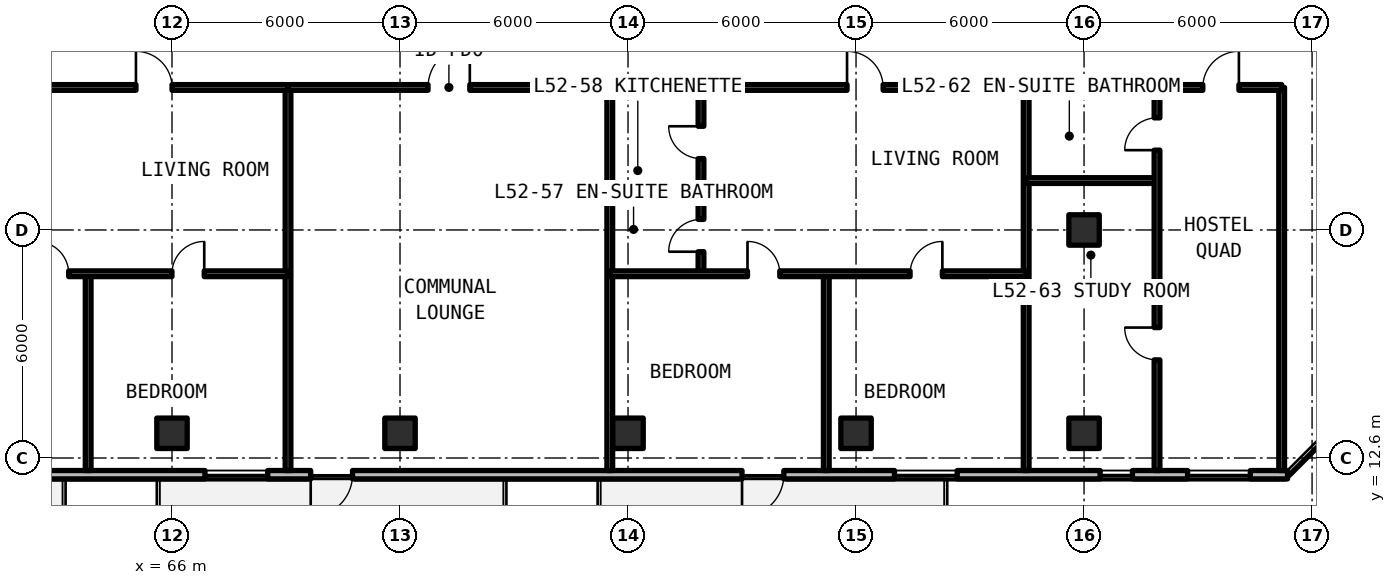
"""IFC4 building model, lengths in metres.
Left out: names, types, materials, properties, quantities, classifications, styles, units other than length and angle.
Written with IfcOpenShell. Run it as: python <this file> out.ifc"""

import sys

from ifc_helpers import new_model, si_unit, direction, frame, frame_2d, origin, origin_2d, place, context, subcontext, project, spatial, rectangle, extrude, element, fill, save


model = new_model("IFC4")
c1 = context("Model", 3, precision=1e-05, world=origin(), true_north=direction((0.0, 1.0)))
c2 = subcontext(c1, "Body", "Model", "MODEL_VIEW")
j1 = project(units=[si_unit("LENGTHUNIT", "METRE"), si_unit("PLANEANGLEUNIT", "RADIAN")], contexts=[c1])
p1 = place(None, origin())
s1 = spatial("IfcSite", under=j1, at=p1, CompositionType="ELEMENT")
p2 = place(p1, origin())
s2 = spatial("IfcBuilding", under=s1, at=p2, CompositionType="ELEMENT")
p3 = place(p2, frame((0.0, 0.0, 188.43)))
s3 = spatial("IfcBuildingStorey", under=s2, at=p3, CompositionType="ELEMENT", Elevation=188.43)
for number, where, z_axis, x_axis in (
    (1, (90.0, 18.6, 0.0), (0.0, 0.0, 1.0), (1.0, 0.0, 0.0)),
    (2, (66.0, 13.25, 0.0), (0.0, 0.0, 1.0), (1.0, 0.0, 0.0)),
    (3, (72.0, 13.25, 0.0), (0.0, 0.0, 1.0), (1.0, 0.0, 0.0)),
    (4, (78.0, 13.25, 0.0), (0.0, 0.0, 1.0), (1.0, 0.0, 0.0)),
    (5, (84.0, 13.25, 0.0), (0.0, 0.0, 1.0), (1.0, 0.0, 0.0)),
    (6, (90.0, 13.25, 0.0), (0.0, 0.0, 1.0), (1.0, 0.0, 0.0)),
):
    element("IfcColumn", number, at=place(p3, frame(where, z_axis=z_axis, x_axis=x_axis)), inside=s3, PredefinedType="COLUMN", context=c2, shape_type="SweptSolid", body=[
        extrude(rectangle(XDim=0.8, YDim=0.8, at=origin_2d()), origin(), (0.0, 0.0, 1.0), 3.3),
    ])
p4 = place(p3, frame((52.11, 12.16, 0.0), z_axis=(0.0, 0.0, 1.0), x_axis=(1.0, 0.0, 0.0)))
e7 = element("IfcWall", 7, at=p4, inside=s3, PredefinedType="SOLIDWALL", context=c2, shape_type="SweptSolid", body=[
    extrude(rectangle(XDim=43.244, YDim=0.22, at=frame_2d((21.622, 0.0))), origin(), (0.0, 0.0, 1.0), 3.08),
])
p5 = place(p4, frame((4.19, 0.0, 0.0)))
e8 = element("IfcOpeningElement", 8, at=p5, cuts=e7, PredefinedType="OPENING", context=c2, shape_type="SweptSolid", body=[
    extrude(rectangle(XDim=1.1, YDim=2.15, at=frame_2d((0.55, 1.075))), frame((0.0, 0.12, 0.0), z_axis=(0.0, -1.0, 0.0), x_axis=(1.0, 0.0, 0.0)), (0.0, 0.0, 1.0), 0.24),
])
p6 = place(p4, frame((17.54, 0.0, 0.0)))
e9 = element("IfcOpeningElement", 9, at=p6, cuts=e7, PredefinedType="OPENING", context=c2, shape_type="SweptSolid", body=[
    extrude(rectangle(XDim=1.1, YDim=2.15, at=frame_2d((0.55, 1.075))), frame((0.0, 0.12, 0.0), z_axis=(0.0, -1.0, 0.0), x_axis=(1.0, 0.0, 0.0)), (0.0, 0.0, 1.0), 0.24),
])
p7 = place(p4, frame((28.89, 0.0, 0.0)))
e10 = element("IfcOpeningElement", 10, at=p7, cuts=e7, PredefinedType="OPENING", context=c2, shape_type="SweptSolid", body=[
    extrude(rectangle(XDim=1.1, YDim=2.15, at=frame_2d((0.55, 1.075))), frame((0.0, 0.12, 0.0), z_axis=(0.0, -1.0, 0.0), x_axis=(1.0, 0.0, 0.0)), (0.0, 0.0, 1.0), 0.24),
])
p8 = place(p4, frame((8.66, 0.0, 0.78)))
e11 = element("IfcOpeningElement", 11, at=p8, cuts=e7, PredefinedType="OPENING", context=c2, shape_type="SweptSolid", body=[
    extrude(rectangle(XDim=1.65, YDim=1.66, at=frame_2d((0.825, 0.83))), frame((0.0, 0.12, 0.0), z_axis=(0.0, -1.0, 0.0), x_axis=(1.0, 0.0, 0.0)), (0.0, 0.0, 1.0), 0.24),
])
p9 = place(p4, frame((14.759, 0.0, 0.78)))
e12 = element("IfcOpeningElement", 12, at=p9, cuts=e7, PredefinedType="OPENING", context=c2, shape_type="SweptSolid", body=[
    extrude(rectangle(XDim=1.65, YDim=1.66, at=frame_2d((0.825, 0.83))), frame((0.0, 0.12, 0.0), z_axis=(0.0, -1.0, 0.0), x_axis=(1.0, 0.0, 0.0)), (0.0, 0.0, 1.0), 0.24),
])
p10 = place(p4, frame((32.902, 0.0, 0.78)))
e13 = element("IfcOpeningElement", 13, at=p10, cuts=e7, PredefinedType="OPENING", context=c2, shape_type="SweptSolid", body=[
    extrude(rectangle(XDim=1.65, YDim=1.66, at=frame_2d((0.825, 0.83))), frame((0.0, 0.12, 0.0), z_axis=(0.0, -1.0, 0.0), x_axis=(1.0, 0.0, 0.0)), (0.0, 0.0, 1.0), 0.24),
])
p11 = place(p4, frame((38.313, 0.0, 0.78)))
e14 = element("IfcOpeningElement", 14, at=p11, cuts=e7, PredefinedType="OPENING", context=c2, shape_type="SweptSolid", body=[
    extrude(rectangle(XDim=0.85, YDim=1.65, at=frame_2d((0.425, 0.825))), frame((0.0, 0.12, 0.0), z_axis=(0.0, -1.0, 0.0), x_axis=(1.0, 0.0, 0.0)), (0.0, 0.0, 1.0), 0.24),
])
p12 = place(p4, frame((40.615, 0.0, 0.78)))
e15 = element("IfcOpeningElement", 15, at=p12, cuts=e7, PredefinedType="OPENING", context=c2, shape_type="SweptSolid", body=[
    extrude(rectangle(XDim=1.65, YDim=1.66, at=frame_2d((0.825, 0.83))), frame((0.0, 0.12, 0.0), z_axis=(0.0, -1.0, 0.0), x_axis=(1.0, 0.0, 0.0)), (0.0, 0.0, 1.0), 0.24),
])
for number, where, z_axis, x_axis in (
    (16, (95.2, 12.27, 0.0), (0.0, 0.0, 1.0), (0.0, 1.0, 0.0)),
    (17, (69.053, 12.27, 0.0), (0.0, 0.0, 1.0), (0.0, 1.0, 0.0)),
):
    element("IfcWall", number, at=place(p3, frame(where, z_axis=z_axis, x_axis=x_axis)), inside=s3, PredefinedType="SOLIDWALL", context=c2, shape_type="SweptSolid", body=[
        extrude(rectangle(XDim=10.08, YDim=0.15, at=frame_2d((5.04, 0.0))), origin(), (0.0, 0.0, 1.0), 2.35),
    ])
p13 = place(p3, frame((63.794, 12.27, 0.0), z_axis=(0.0, 0.0, 1.0), x_axis=(0.0, 1.0, 0.0)))
e18 = element("IfcWall", 18, at=p13, inside=s3, PredefinedType="PARTITIONING", context=c2, shape_type="SweptSolid", body=[
    extrude(rectangle(XDim=5.178, YDim=0.15, at=frame_2d((2.589, 0.0))), origin(), (0.0, 0.0, 1.0), 2.35),
])
p14 = place(p3, frame((58.096, 17.448, 0.0), z_axis=(0.0, 0.0, 1.0), x_axis=(1.0, 0.0, 0.0)))
e19 = element("IfcWall", 19, at=p14, inside=s3, PredefinedType="PARTITIONING", context=c2, shape_type="SweptSolid", body=[
    extrude(rectangle(XDim=10.957, YDim=0.15, at=frame_2d((5.479, 0.0))), origin(), (0.0, 0.0, 1.0), 2.35),
])
p15 = place(p14, frame((4.335, 0.0, 0.0)))
e20 = element("IfcOpeningElement", 20, at=p15, cuts=e19, PredefinedType="OPENING", context=c2, shape_type="SweptSolid", body=[
    extrude(rectangle(XDim=0.85, YDim=2.1, at=frame_2d((0.425, 1.05))), frame((0.0, 0.085, 0.0), z_axis=(0.0, -1.0, 0.0), x_axis=(1.0, 0.0, 0.0)), (0.0, 0.0, 1.0), 0.17),
])
p16 = place(p14, frame((7.902, 0.0, 0.0)))
e21 = element("IfcOpeningElement", 21, at=p16, cuts=e19, PredefinedType="OPENING", context=c2, shape_type="SweptSolid", body=[
    extrude(rectangle(XDim=0.85, YDim=2.1, at=frame_2d((0.425, 1.05))), frame((0.0, 0.085, 0.0), z_axis=(0.0, -1.0, 0.0), x_axis=(1.0, 0.0, 0.0)), (0.0, 0.0, 1.0), 0.17),
])
p17 = place(p3, frame((58.096, 22.35, 0.0), z_axis=(0.0, 0.0, 1.0), x_axis=(1.0, 0.0, 0.0)))
e22 = element("IfcWall", 22, at=p17, inside=s3, PredefinedType="SOLIDWALL", context=c2, shape_type="SweptSolid", body=[
    extrude(rectangle(XDim=10.957, YDim=0.15, at=frame_2d((5.479, 0.0))), origin(), (0.0, 0.0, 1.0), 2.35),
])
p18 = place(p17, frame((6.955, 0.0, 0.0)))
e23 = element("IfcOpeningElement", 23, at=p18, cuts=e22, PredefinedType="OPENING", context=c2, shape_type="SweptSolid", body=[
    extrude(rectangle(XDim=0.95, YDim=2.15, at=frame_2d((0.475, 1.075))), frame((0.0, 0.085, 0.0), z_axis=(0.0, -1.0, 0.0), x_axis=(1.0, 0.0, 0.0)), (0.0, 0.0, 1.0), 0.17),
])
p19 = place(p3, frame((77.52, 12.27, 0.0), z_axis=(0.0, 0.0, 1.0), x_axis=(0.0, 1.0, 0.0)))
e24 = element("IfcWall", 24, at=p19, inside=s3, PredefinedType="SOLIDWALL", context=c2, shape_type="SweptSolid", body=[
    extrude(rectangle(XDim=10.08, YDim=0.15, at=frame_2d((5.04, 0.0))), origin(), (0.0, 0.0, 1.0), 2.35),
])
p20 = place(p3, frame((69.053, 22.35, 0.0), z_axis=(0.0, 0.0, 1.0), x_axis=(1.0, 0.0, 0.0)))
e25 = element("IfcWall", 25, at=p20, inside=s3, PredefinedType="SOLIDWALL", context=c2, shape_type="SweptSolid", body=[
    extrude(rectangle(XDim=8.467, YDim=0.15, at=frame_2d((4.233, 0.0))), origin(), (0.0, 0.0, 1.0), 2.35),
])
p21 = place(p20, frame((3.683, 0.0, 0.0)))
e26 = element("IfcOpeningElement", 26, at=p21, cuts=e25, PredefinedType="OPENING", context=c2, shape_type="SweptSolid", body=[
    extrude(rectangle(XDim=1.1, YDim=2.15, at=frame_2d((0.55, 1.075))), frame((0.0, 0.085, 0.0), z_axis=(0.0, -1.0, 0.0), x_axis=(1.0, 0.0, 0.0)), (0.0, 0.0, 1.0), 0.17),
])
p22 = place(p3, frame((88.477, 12.27, 0.0), z_axis=(0.0, 0.0, 1.0), x_axis=(0.0, 1.0, 0.0)))
e27 = element("IfcWall", 27, at=p22, inside=s3, PredefinedType="SOLIDWALL", context=c2, shape_type="SweptSolid", body=[
    extrude(rectangle(XDim=10.08, YDim=0.15, at=frame_2d((5.04, 0.0))), origin(), (0.0, 0.0, 1.0), 2.35),
])
p23 = place(p3, frame((77.52, 19.458, 0.0), z_axis=(0.0, 0.0, 1.0), x_axis=(1.0, 0.0, 0.0)))
e28 = element("IfcWall", 28, at=p23, inside=s3, PredefinedType="PARTITIONING", context=c2, shape_type="SweptSolid", body=[
    extrude(rectangle(XDim=2.4, YDim=0.15, at=frame_2d((1.2, 0.0))), origin(), (0.0, 0.0, 1.0), 2.35),
])
p24 = place(p3, frame((79.92, 17.448, 0.0), z_axis=(0.0, 0.0, 1.0), x_axis=(0.0, 1.0, 0.0)))
e29 = element("IfcWall", 29, at=p24, inside=s3, PredefinedType="PARTITIONING", context=c2, shape_type="SweptSolid", body=[
    extrude(rectangle(XDim=4.902, YDim=0.15, at=frame_2d((2.451, 0.0))), origin(), (0.0, 0.0, 1.0), 2.35),
])
p25 = place(p24, frame((0.58, 0.0, 0.0)))
e30 = element("IfcOpeningElement", 30, at=p25, cuts=e29, PredefinedType="OPENING", context=c2, shape_type="SweptSolid", body=[
    extrude(rectangle(XDim=0.85, YDim=2.1, at=frame_2d((0.425, 1.05))), frame((0.0, 0.085, 0.0), z_axis=(0.0, -1.0, 0.0), x_axis=(1.0, 0.0, 0.0)), (0.0, 0.0, 1.0), 0.17),
])
p26 = place(p24, frame((3.031, 0.0, 0.0)))
e31 = element("IfcOpeningElement", 31, at=p26, cuts=e29, PredefinedType="OPENING", context=c2, shape_type="SweptSolid", body=[
    extrude(rectangle(XDim=0.85, YDim=2.1, at=frame_2d((0.425, 1.05))), frame((0.0, 0.085, 0.0), z_axis=(0.0, -1.0, 0.0), x_axis=(1.0, 0.0, 0.0)), (0.0, 0.0, 1.0), 0.17),
])
p27 = place(p3, frame((83.217, 12.27, 0.0), z_axis=(0.0, 0.0, 1.0), x_axis=(0.0, 1.0, 0.0)))
e32 = element("IfcWall", 32, at=p27, inside=s3, PredefinedType="PARTITIONING", context=c2, shape_type="SweptSolid", body=[
    extrude(rectangle(XDim=5.178, YDim=0.15, at=frame_2d((2.589, 0.0))), origin(), (0.0, 0.0, 1.0), 2.35),
])
p28 = place(p3, frame((77.52, 17.448, 0.0), z_axis=(0.0, 0.0, 1.0), x_axis=(1.0, 0.0, 0.0)))
e33 = element("IfcWall", 33, at=p28, inside=s3, PredefinedType="PARTITIONING", context=c2, shape_type="SweptSolid", body=[
    extrude(rectangle(XDim=10.957, YDim=0.15, at=frame_2d((5.479, 0.0))), origin(), (0.0, 0.0, 1.0), 2.35),
])
p29 = place(p28, frame((3.624, 0.0, 0.0)))
e34 = element("IfcOpeningElement", 34, at=p29, cuts=e33, PredefinedType="OPENING", context=c2, shape_type="SweptSolid", body=[
    extrude(rectangle(XDim=0.85, YDim=2.1, at=frame_2d((0.425, 1.05))), frame((0.0, 0.085, 0.0), z_axis=(0.0, -1.0, 0.0), x_axis=(1.0, 0.0, 0.0)), (0.0, 0.0, 1.0), 0.17),
])
p30 = place(p28, frame((7.902, 0.0, 0.0)))
e35 = element("IfcOpeningElement", 35, at=p30, cuts=e33, PredefinedType="OPENING", context=c2, shape_type="SweptSolid", body=[
    extrude(rectangle(XDim=0.85, YDim=2.1, at=frame_2d((0.425, 1.05))), frame((0.0, 0.085, 0.0), z_axis=(0.0, -1.0, 0.0), x_axis=(1.0, 0.0, 0.0)), (0.0, 0.0, 1.0), 0.17),
])
p31 = place(p3, frame((77.52, 22.35, 0.0), z_axis=(0.0, 0.0, 1.0), x_axis=(1.0, 0.0, 0.0)))
e36 = element("IfcWall", 36, at=p31, inside=s3, PredefinedType="SOLIDWALL", context=c2, shape_type="SweptSolid", body=[
    extrude(rectangle(XDim=10.957, YDim=0.15, at=frame_2d((5.479, 0.0))), origin(), (0.0, 0.0, 1.0), 2.35),
])
p32 = place(p31, frame((6.243, 0.0, 0.0)))
e37 = element("IfcOpeningElement", 37, at=p32, cuts=e36, PredefinedType="OPENING", context=c2, shape_type="SweptSolid", body=[
    extrude(rectangle(XDim=0.95, YDim=2.15, at=frame_2d((0.475, 1.075))), frame((0.0, 0.085, 0.0), z_axis=(0.0, -1.0, 0.0), x_axis=(1.0, 0.0, 0.0)), (0.0, 0.0, 1.0), 0.17),
])
p33 = place(p3, frame((88.477, 19.9, 0.0), z_axis=(0.0, 0.0, 1.0), x_axis=(1.0, 0.0, 0.0)))
e38 = element("IfcWall", 38, at=p33, inside=s3, PredefinedType="PARTITIONING", context=c2, shape_type="SweptSolid", body=[
    extrude(rectangle(XDim=3.443, YDim=0.15, at=frame_2d((1.722, 0.0))), origin(), (0.0, 0.0, 1.0), 2.35),
])
p34 = place(p3, frame((91.92, 12.27, 0.0), z_axis=(0.0, 0.0, 1.0), x_axis=(0.0, 1.0, 0.0)))
e39 = element("IfcWall", 39, at=p34, inside=s3, PredefinedType="PARTITIONING", context=c2, shape_type="SweptSolid", body=[
    extrude(rectangle(XDim=10.08, YDim=0.15, at=frame_2d((5.04, 0.0))), origin(), (0.0, 0.0, 1.0), 2.35),
])
p35 = place(p34, frame((2.912, 0.0, 0.0)))
e40 = element("IfcOpeningElement", 40, at=p35, cuts=e39, PredefinedType="OPENING", context=c2, shape_type="SweptSolid", body=[
    extrude(rectangle(XDim=0.85, YDim=2.1, at=frame_2d((0.425, 1.05))), frame((0.0, 0.085, 0.0), z_axis=(0.0, -1.0, 0.0), x_axis=(1.0, 0.0, 0.0)), (0.0, 0.0, 1.0), 0.17),
])
p36 = place(p34, frame((8.43, 0.0, 0.0)))
e41 = element("IfcOpeningElement", 41, at=p36, cuts=e39, PredefinedType="OPENING", context=c2, shape_type="SweptSolid", body=[
    extrude(rectangle(XDim=0.85, YDim=2.1, at=frame_2d((0.425, 1.05))), frame((0.0, 0.085, 0.0), z_axis=(0.0, -1.0, 0.0), x_axis=(1.0, 0.0, 0.0)), (0.0, 0.0, 1.0), 0.17),
])
p37 = place(p3, frame((88.477, 22.35, 0.0), z_axis=(0.0, 0.0, 1.0), x_axis=(1.0, 0.0, 0.0)))
e42 = element("IfcWall", 42, at=p37, inside=s3, PredefinedType="SOLIDWALL", context=c2, shape_type="SweptSolid", body=[
    extrude(rectangle(XDim=6.723, YDim=0.15, at=frame_2d((3.362, 0.0))), origin(), (0.0, 0.0, 1.0), 2.35),
])
p38 = place(p37, frame((4.648, 0.0, 0.0)))
e43 = element("IfcOpeningElement", 43, at=p38, cuts=e42, PredefinedType="OPENING", context=c2, shape_type="SweptSolid", body=[
    extrude(rectangle(XDim=0.95, YDim=2.15, at=frame_2d((0.475, 1.075))), frame((0.0, 0.085, 0.0), z_axis=(0.0, -1.0, 0.0), x_axis=(1.0, 0.0, 0.0)), (0.0, 0.0, 1.0), 0.17),
])
p39 = place(p6, frame((1.1, 0.0, 0.0), z_axis=(0.0, 0.0, 1.0), x_axis=(-1.0, 0.0, 0.0)))
e44 = element("IfcDoor", 44, at=p39, inside=s3, OperationType="SINGLE_SWING_LEFT", PredefinedType="DOOR", context=c2, shape_type="SweptSolid", body=[
    extrude(rectangle(XDim=1.1, YDim=2.15, at=frame_2d((0.55, 1.075))), frame((0.0, 0.025, 0.0), z_axis=(0.0, -1.0, 0.0), x_axis=(1.0, 0.0, 0.0)), (0.0, 0.0, 1.0), 0.05),
])
fill(e9, e44)
p40 = place(p7, frame((1.1, 0.0, 0.0), z_axis=(0.0, 0.0, 1.0), x_axis=(-1.0, 0.0, 0.0)))
e45 = element("IfcDoor", 45, at=p40, inside=s3, OperationType="SINGLE_SWING_RIGHT", PredefinedType="DOOR", context=c2, shape_type="SweptSolid", body=[
    extrude(rectangle(XDim=1.1, YDim=2.15, at=frame_2d((0.55, 1.075))), frame((0.0, 0.025, 0.0), z_axis=(0.0, -1.0, 0.0), x_axis=(1.0, 0.0, 0.0)), (0.0, 0.0, 1.0), 0.05),
])
fill(e10, e45)
p41 = place(p9, origin())
e46 = element("IfcWindow", 46, at=p41, inside=s3, PartitioningType="SINGLE_PANEL", PredefinedType="WINDOW", context=c2, shape_type="SweptSolid", body=[
    extrude(rectangle(XDim=1.65, YDim=1.66, at=frame_2d((0.825, 0.83))), frame((0.0, 0.03, 0.0), z_axis=(0.0, -1.0, 0.0), x_axis=(1.0, 0.0, 0.0)), (0.0, 0.0, 1.0), 0.06),
])
fill(e12, e46)
p42 = place(p10, origin())
e47 = element("IfcWindow", 47, at=p42, inside=s3, PartitioningType="SINGLE_PANEL", PredefinedType="WINDOW", context=c2, shape_type="SweptSolid", body=[
    extrude(rectangle(XDim=1.65, YDim=1.66, at=frame_2d((0.825, 0.83))), frame((0.0, 0.03, 0.0), z_axis=(0.0, -1.0, 0.0), x_axis=(1.0, 0.0, 0.0)), (0.0, 0.0, 1.0), 0.06),
])
fill(e13, e47)
p43 = place(p11, origin())
e48 = element("IfcWindow", 48, at=p43, inside=s3, PartitioningType="SINGLE_PANEL", PredefinedType="WINDOW", context=c2, shape_type="SweptSolid", body=[
    extrude(rectangle(XDim=0.85, YDim=1.65, at=frame_2d((0.425, 0.825))), frame((0.0, 0.03, 0.0), z_axis=(0.0, -1.0, 0.0), x_axis=(1.0, 0.0, 0.0)), (0.0, 0.0, 1.0), 0.06),
])
fill(e14, e48)
p44 = place(p12, origin())
e49 = element("IfcWindow", 49, at=p44, inside=s3, PartitioningType="SINGLE_PANEL", PredefinedType="WINDOW", context=c2, shape_type="SweptSolid", body=[
    extrude(rectangle(XDim=1.65, YDim=1.66, at=frame_2d((0.825, 0.83))), frame((0.0, 0.03, 0.0), z_axis=(0.0, -1.0, 0.0), x_axis=(1.0, 0.0, 0.0)), (0.0, 0.0, 1.0), 0.06),
])
fill(e15, e49)
p45 = place(p15, origin())
e50 = element("IfcDoor", 50, at=p45, inside=s3, OperationType="SINGLE_SWING_LEFT", PredefinedType="DOOR", context=c2, shape_type="SweptSolid", body=[
    extrude(rectangle(XDim=0.85, YDim=2.1, at=frame_2d((0.425, 1.05))), frame((0.0, 0.025, 0.0), z_axis=(0.0, -1.0, 0.0), x_axis=(1.0, 0.0, 0.0)), (0.0, 0.0, 1.0), 0.05),
])
fill(e20, e50)
p46 = place(p16, origin())
e51 = element("IfcDoor", 51, at=p46, inside=s3, OperationType="SINGLE_SWING_RIGHT", PredefinedType="DOOR", context=c2, shape_type="SweptSolid", body=[
    extrude(rectangle(XDim=0.85, YDim=2.1, at=frame_2d((0.425, 1.05))), frame((0.0, 0.025, 0.0), z_axis=(0.0, -1.0, 0.0), x_axis=(1.0, 0.0, 0.0)), (0.0, 0.0, 1.0), 0.05),
])
fill(e21, e51)
p47 = place(p18, origin())
e52 = element("IfcDoor", 52, at=p47, inside=s3, OperationType="SINGLE_SWING_LEFT", PredefinedType="DOOR", context=c2, shape_type="SweptSolid", body=[
    extrude(rectangle(XDim=0.95, YDim=2.15, at=frame_2d((0.475, 1.075))), frame((0.0, 0.025, 0.0), z_axis=(0.0, -1.0, 0.0), x_axis=(1.0, 0.0, 0.0)), (0.0, 0.0, 1.0), 0.05),
])
fill(e23, e52)
p48 = place(p21, origin())
e53 = element("IfcDoor", 53, at=p48, inside=s3, OperationType="SINGLE_SWING_RIGHT", PredefinedType="DOOR", context=c2, shape_type="SweptSolid", body=[
    extrude(rectangle(XDim=1.1, YDim=2.15, at=frame_2d((0.55, 1.075))), frame((0.0, 0.025, 0.0), z_axis=(0.0, -1.0, 0.0), x_axis=(1.0, 0.0, 0.0)), (0.0, 0.0, 1.0), 0.05),
])
fill(e26, e53)
p49 = place(p25, origin())
e54 = element("IfcDoor", 54, at=p49, inside=s3, OperationType="SINGLE_SWING_LEFT", PredefinedType="DOOR", context=c2, shape_type="SweptSolid", body=[
    extrude(rectangle(XDim=0.85, YDim=2.1, at=frame_2d((0.425, 1.05))), frame((0.0, 0.025, 0.0), z_axis=(0.0, -1.0, 0.0), x_axis=(1.0, 0.0, 0.0)), (0.0, 0.0, 1.0), 0.05),
])
fill(e30, e54)
p50 = place(p26, origin())
e55 = element("IfcDoor", 55, at=p50, inside=s3, OperationType="SINGLE_SWING_RIGHT", PredefinedType="DOOR", context=c2, shape_type="SweptSolid", body=[
    extrude(rectangle(XDim=0.85, YDim=2.1, at=frame_2d((0.425, 1.05))), frame((0.0, 0.025, 0.0), z_axis=(0.0, -1.0, 0.0), x_axis=(1.0, 0.0, 0.0)), (0.0, 0.0, 1.0), 0.05),
])
fill(e31, e55)
p51 = place(p29, origin())
e56 = element("IfcDoor", 56, at=p51, inside=s3, OperationType="SINGLE_SWING_LEFT", PredefinedType="DOOR", context=c2, shape_type="SweptSolid", body=[
    extrude(rectangle(XDim=0.85, YDim=2.1, at=frame_2d((0.425, 1.05))), frame((0.0, 0.025, 0.0), z_axis=(0.0, -1.0, 0.0), x_axis=(1.0, 0.0, 0.0)), (0.0, 0.0, 1.0), 0.05),
])
fill(e34, e56)
p52 = place(p30, origin())
e57 = element("IfcDoor", 57, at=p52, inside=s3, OperationType="SINGLE_SWING_RIGHT", PredefinedType="DOOR", context=c2, shape_type="SweptSolid", body=[
    extrude(rectangle(XDim=0.85, YDim=2.1, at=frame_2d((0.425, 1.05))), frame((0.0, 0.025, 0.0), z_axis=(0.0, -1.0, 0.0), x_axis=(1.0, 0.0, 0.0)), (0.0, 0.0, 1.0), 0.05),
])
fill(e35, e57)
p53 = place(p32, origin())
e58 = element("IfcDoor", 58, at=p53, inside=s3, OperationType="SINGLE_SWING_LEFT", PredefinedType="DOOR", context=c2, shape_type="SweptSolid", body=[
    extrude(rectangle(XDim=0.95, YDim=2.15, at=frame_2d((0.475, 1.075))), frame((0.0, 0.025, 0.0), z_axis=(0.0, -1.0, 0.0), x_axis=(1.0, 0.0, 0.0)), (0.0, 0.0, 1.0), 0.05),
])
fill(e37, e58)
p54 = place(p35, origin())
e59 = element("IfcDoor", 59, at=p54, inside=s3, OperationType="SINGLE_SWING_RIGHT", PredefinedType="DOOR", context=c2, shape_type="SweptSolid", body=[
    extrude(rectangle(XDim=0.85, YDim=2.1, at=frame_2d((0.425, 1.05))), frame((0.0, 0.025, 0.0), z_axis=(0.0, -1.0, 0.0), x_axis=(1.0, 0.0, 0.0)), (0.0, 0.0, 1.0), 0.05),
])
fill(e40, e59)
p55 = place(p36, origin())
e60 = element("IfcDoor", 60, at=p55, inside=s3, OperationType="SINGLE_SWING_LEFT", PredefinedType="DOOR", context=c2, shape_type="SweptSolid", body=[
    extrude(rectangle(XDim=0.85, YDim=2.1, at=frame_2d((0.425, 1.05))), frame((0.0, 0.025, 0.0), z_axis=(0.0, -1.0, 0.0), x_axis=(1.0, 0.0, 0.0)), (0.0, 0.0, 1.0), 0.05),
])
fill(e41, e60)
p56 = place(p38, origin())
e61 = element("IfcDoor", 61, at=p56, inside=s3, OperationType="SINGLE_SWING_RIGHT", PredefinedType="DOOR", context=c2, shape_type="SweptSolid", body=[
    extrude(rectangle(XDim=0.95, YDim=2.15, at=frame_2d((0.475, 1.075))), frame((0.0, 0.025, 0.0), z_axis=(0.0, -1.0, 0.0), x_axis=(1.0, 0.0, 0.0)), (0.0, 0.0, 1.0), 0.05),
])
fill(e43, e61)
save(model, sys.argv[1])
